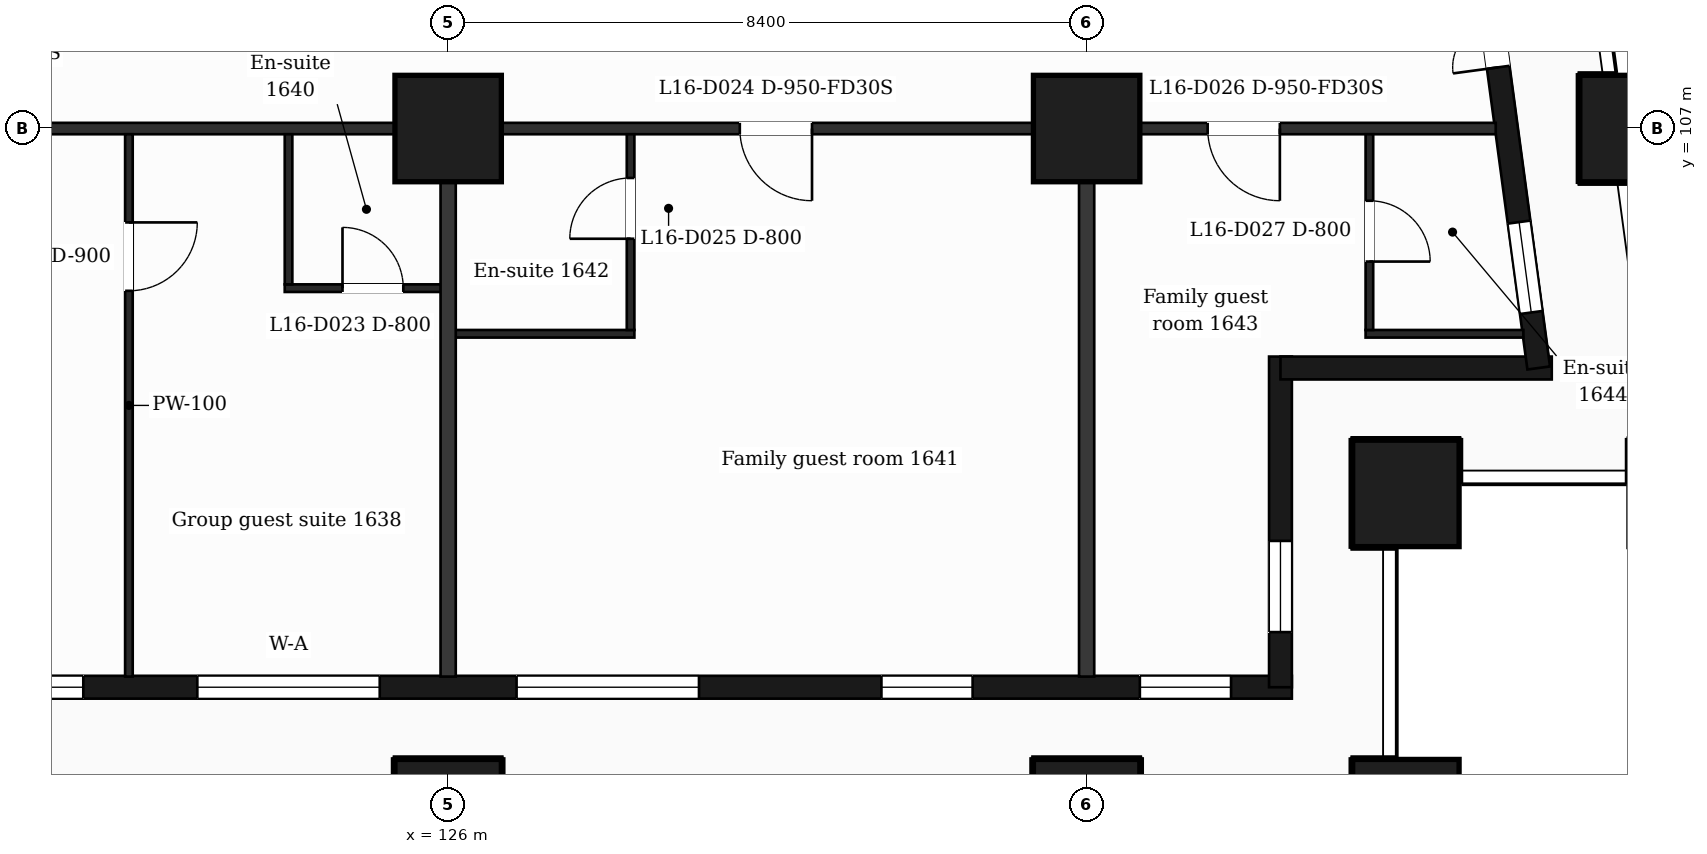
"""IFC4 building model, lengths in metres.
Left out: names, types, materials, properties, quantities, classifications, styles, units other than length and angle.
Written with IfcOpenShell. Run it as: python <this file> out.ifc"""

import sys

from ifc_helpers import new_model, si_unit, direction, frame, frame_2d, origin, origin_2d, place, context, subcontext, project, spatial, rectangle, extrude, element, fill, save


model = new_model("IFC4")
c1 = context("Model", 3, precision=1e-05, world=origin(), true_north=direction((0.0, 1.0)))
c2 = subcontext(c1, "Body", "Model", "MODEL_VIEW")
j1 = project(units=[si_unit("LENGTHUNIT", "METRE"), si_unit("PLANEANGLEUNIT", "RADIAN")], contexts=[c1])
p1 = place(None, origin())
s1 = spatial("IfcSite", under=j1, at=p1, CompositionType="ELEMENT")
p2 = place(p1, origin())
s2 = spatial("IfcBuilding", under=s1, at=p2, CompositionType="ELEMENT")
p3 = place(p2, frame((0.0, 0.0, 74.0)))
s3 = spatial("IfcBuildingStorey", under=s2, at=p3, CompositionType="ELEMENT", Elevation=74.0)
for number, where, z_axis, x_axis in (
    (1, (126.0, 98.0, 0.0), (0.0, 0.0, 1.0), (1.0, 0.0, 0.0)),
    (2, (134.4, 98.0, 0.0), (0.0, 0.0, 1.0), (1.0, 0.0, 0.0)),
    (3, (138.6, 98.0, 0.0), (0.0, 0.0, 1.0), (1.0, 0.0, 0.0)),
    (4, (138.6, 102.2, 0.0), (0.0, 0.0, 1.0), (1.0, 0.0, 0.0)),
    (5, (126.0, 107.0, 0.0), (0.0, 0.0, 1.0), (1.0, 0.0, 0.0)),
    (6, (134.4, 107.0, 0.0), (0.0, 0.0, 1.0), (1.0, 0.0, 0.0)),
    (7, (141.588, 107.0, 0.0), (0.0, 0.0, 1.0), (1.0, 0.0, 0.0)),
):
    element("IfcColumn", number, at=place(p3, frame(where, z_axis=z_axis, x_axis=x_axis)), inside=s3, PredefinedType="COLUMN", context=c2, shape_type="SweptSolid", body=[
        extrude(rectangle(XDim=1.4, YDim=1.4, at=origin_2d()), origin(), (0.0, 0.0, 1.0), 3.5),
    ])
p4 = place(p3, frame((89.85, 99.65, 0.0), z_axis=(0.0, 0.0, 1.0), x_axis=(1.0, 0.0, 0.0)))
e8 = element("IfcWall", 8, at=p4, inside=s3, PredefinedType="SOLIDWALL", context=c2, shape_type="SweptSolid", body=[
    extrude(rectangle(XDim=47.25, YDim=0.3, at=frame_2d((23.625, 0.0))), origin(), (0.0, 0.0, 1.0), 3.18),
])
p5 = place(p4, frame((0.725, 0.0, 0.9)))
e9 = element("IfcOpeningElement", 9, at=p5, cuts=e8, PredefinedType="OPENING", context=c2, shape_type="SweptSolid", body=[
    extrude(rectangle(XDim=1.2, YDim=2.1, at=frame_2d((0.6, 1.05))), frame((0.0, 0.16, 0.0), z_axis=(0.0, -1.0, 0.0), x_axis=(1.0, 0.0, 0.0)), (0.0, 0.0, 1.0), 0.32),
])
p6 = place(p4, frame((3.45, 0.0, 0.9)))
e10 = element("IfcOpeningElement", 10, at=p6, cuts=e8, PredefinedType="OPENING", context=c2, shape_type="SweptSolid", body=[
    extrude(rectangle(XDim=2.4, YDim=2.1, at=frame_2d((1.2, 1.05))), frame((0.0, 0.16, 0.0), z_axis=(0.0, -1.0, 0.0), x_axis=(1.0, 0.0, 0.0)), (0.0, 0.0, 1.0), 0.32),
])
p7 = place(p4, frame((7.65, 0.0, 0.9)))
e11 = element("IfcOpeningElement", 11, at=p7, cuts=e8, PredefinedType="OPENING", context=c2, shape_type="SweptSolid", body=[
    extrude(rectangle(XDim=2.4, YDim=2.1, at=frame_2d((1.2, 1.05))), frame((0.0, 0.16, 0.0), z_axis=(0.0, -1.0, 0.0), x_axis=(1.0, 0.0, 0.0)), (0.0, 0.0, 1.0), 0.32),
])
p8 = place(p4, frame((12.45, 0.0, 0.9)))
e12 = element("IfcOpeningElement", 12, at=p8, cuts=e8, PredefinedType="OPENING", context=c2, shape_type="SweptSolid", body=[
    extrude(rectangle(XDim=1.2, YDim=2.1, at=frame_2d((0.6, 1.05))), frame((0.0, 0.16, 0.0), z_axis=(0.0, -1.0, 0.0), x_axis=(1.0, 0.0, 0.0)), (0.0, 0.0, 1.0), 0.32),
])
p9 = place(p4, frame((16.65, 0.0, 0.9)))
e13 = element("IfcOpeningElement", 13, at=p9, cuts=e8, PredefinedType="OPENING", context=c2, shape_type="SweptSolid", body=[
    extrude(rectangle(XDim=1.2, YDim=2.1, at=frame_2d((0.6, 1.05))), frame((0.0, 0.16, 0.0), z_axis=(0.0, -1.0, 0.0), x_axis=(1.0, 0.0, 0.0)), (0.0, 0.0, 1.0), 0.32),
])
p10 = place(p4, frame((19.95, 0.0, 0.9)))
e14 = element("IfcOpeningElement", 14, at=p10, cuts=e8, PredefinedType="OPENING", context=c2, shape_type="SweptSolid", body=[
    extrude(rectangle(XDim=1.2, YDim=2.1, at=frame_2d((0.6, 1.05))), frame((0.0, 0.16, 0.0), z_axis=(0.0, -1.0, 0.0), x_axis=(1.0, 0.0, 0.0)), (0.0, 0.0, 1.0), 0.32),
])
p11 = place(p4, frame((21.75, 0.0, 0.9)))
e15 = element("IfcOpeningElement", 15, at=p11, cuts=e8, PredefinedType="OPENING", context=c2, shape_type="SweptSolid", body=[
    extrude(rectangle(XDim=1.2, YDim=2.1, at=frame_2d((0.6, 1.05))), frame((0.0, 0.16, 0.0), z_axis=(0.0, -1.0, 0.0), x_axis=(1.0, 0.0, 0.0)), (0.0, 0.0, 1.0), 0.32),
])
p12 = place(p4, frame((25.05, 0.0, 0.0)))
e16 = element("IfcOpeningElement", 16, at=p12, cuts=e8, PredefinedType="OPENING", context=c2, shape_type="SweptSolid", body=[
    extrude(rectangle(XDim=1.2, YDim=2.4, at=frame_2d((0.6, 1.2))), frame((0.0, 0.16, 0.0), z_axis=(0.0, -1.0, 0.0), x_axis=(1.0, 0.0, 0.0)), (0.0, 0.0, 1.0), 0.32),
])
p13 = place(p4, frame((28.35, 0.0, 0.9)))
e17 = element("IfcOpeningElement", 17, at=p13, cuts=e8, PredefinedType="OPENING", context=c2, shape_type="SweptSolid", body=[
    extrude(rectangle(XDim=1.2, YDim=2.1, at=frame_2d((0.6, 1.05))), frame((0.0, 0.16, 0.0), z_axis=(0.0, -1.0, 0.0), x_axis=(1.0, 0.0, 0.0)), (0.0, 0.0, 1.0), 0.32),
])
p14 = place(p4, frame((30.15, 0.0, 0.9)))
e18 = element("IfcOpeningElement", 18, at=p14, cuts=e8, PredefinedType="OPENING", context=c2, shape_type="SweptSolid", body=[
    extrude(rectangle(XDim=1.2, YDim=2.1, at=frame_2d((0.6, 1.05))), frame((0.0, 0.16, 0.0), z_axis=(0.0, -1.0, 0.0), x_axis=(1.0, 0.0, 0.0)), (0.0, 0.0, 1.0), 0.32),
])
p15 = place(p4, frame((32.85, 0.0, 0.9)))
e19 = element("IfcOpeningElement", 19, at=p15, cuts=e8, PredefinedType="OPENING", context=c2, shape_type="SweptSolid", body=[
    extrude(rectangle(XDim=2.4, YDim=2.1, at=frame_2d((1.2, 1.05))), frame((0.0, 0.16, 0.0), z_axis=(0.0, -1.0, 0.0), x_axis=(1.0, 0.0, 0.0)), (0.0, 0.0, 1.0), 0.32),
])
p16 = place(p4, frame((37.05, 0.0, 0.9)))
e20 = element("IfcOpeningElement", 20, at=p16, cuts=e8, PredefinedType="OPENING", context=c2, shape_type="SweptSolid", body=[
    extrude(rectangle(XDim=2.4, YDim=2.1, at=frame_2d((1.2, 1.05))), frame((0.0, 0.16, 0.0), z_axis=(0.0, -1.0, 0.0), x_axis=(1.0, 0.0, 0.0)), (0.0, 0.0, 1.0), 0.32),
])
p17 = place(p4, frame((41.85, 0.0, 0.9)))
e21 = element("IfcOpeningElement", 21, at=p17, cuts=e8, PredefinedType="OPENING", context=c2, shape_type="SweptSolid", body=[
    extrude(rectangle(XDim=1.2, YDim=2.1, at=frame_2d((0.6, 1.05))), frame((0.0, 0.16, 0.0), z_axis=(0.0, -1.0, 0.0), x_axis=(1.0, 0.0, 0.0)), (0.0, 0.0, 1.0), 0.32),
])
p18 = place(p4, frame((45.25, 0.0, 0.9)))
e22 = element("IfcOpeningElement", 22, at=p18, cuts=e8, PredefinedType="OPENING", context=c2, shape_type="SweptSolid", body=[
    extrude(rectangle(XDim=1.2, YDim=2.1, at=frame_2d((0.6, 1.05))), frame((0.0, 0.16, 0.0), z_axis=(0.0, -1.0, 0.0), x_axis=(1.0, 0.0, 0.0)), (0.0, 0.0, 1.0), 0.32),
])
p19 = place(p3, frame((136.95, 99.65, 0.0), z_axis=(0.0, 0.0, 1.0), x_axis=(0.0, 1.0, 0.0)))
e23 = element("IfcWall", 23, at=p19, inside=s3, PredefinedType="SOLIDWALL", context=c2, shape_type="SweptSolid", body=[
    extrude(rectangle(XDim=4.35, YDim=0.3, at=frame_2d((2.175, 0.0))), origin(), (0.0, 0.0, 1.0), 3.18),
])
p20 = place(p19, frame((0.725, 0.0, 0.9)))
e24 = element("IfcOpeningElement", 24, at=p20, cuts=e23, PredefinedType="OPENING", context=c2, shape_type="SweptSolid", body=[
    extrude(rectangle(XDim=1.2, YDim=2.1, at=frame_2d((0.6, 1.05))), frame((0.0, 0.16, 0.0), z_axis=(0.0, -1.0, 0.0), x_axis=(1.0, 0.0, 0.0)), (0.0, 0.0, 1.0), 0.32),
])
p21 = place(p3, frame((136.95, 103.85, 0.0), z_axis=(0.0, 0.0, 1.0), x_axis=(1.0, 0.0, 0.0)))
e25 = element("IfcWall", 25, at=p21, inside=s3, PredefinedType="SOLIDWALL", context=c2, shape_type="SweptSolid", body=[
    extrude(rectangle(XDim=3.569, YDim=0.3, at=frame_2d((1.785, 0.0))), origin(), (0.0, 0.0, 1.0), 3.18),
])
p22 = place(p3, frame((140.348, 103.85, 0.0), z_axis=(0.0, 0.0, 1.0), x_axis=(-0.133431549479, 0.991058031401, 0.0)))
e26 = element("IfcWall", 26, at=p22, inside=s3, PredefinedType="SOLIDWALL", context=c2, shape_type="SweptSolid", body=[
    extrude(rectangle(XDim=6.609, YDim=0.3, at=frame_2d((3.304, 0.0))), origin(), (0.0, 0.0, 1.0), 3.18),
])
p23 = place(p22, frame((0.737, 0.0, 0.9)))
e27 = element("IfcOpeningElement", 27, at=p23, cuts=e26, PredefinedType="OPENING", context=c2, shape_type="SweptSolid", body=[
    extrude(rectangle(XDim=1.2, YDim=2.1, at=frame_2d((0.6, 1.05))), frame((0.0, 0.16, 0.0), z_axis=(0.0, -1.0, 0.0), x_axis=(1.0, 0.0, 0.0)), (0.0, 0.0, 1.0), 0.32),
])
p24 = place(p22, frame((3.991, 0.0, 0.0)))
e28 = element("IfcOpeningElement", 28, at=p24, cuts=e26, PredefinedType="OPENING", context=c2, shape_type="SweptSolid", body=[
    extrude(rectangle(XDim=1.2, YDim=2.4, at=frame_2d((0.6, 1.2))), frame((0.0, 0.16, 0.0), z_axis=(0.0, -1.0, 0.0), x_axis=(1.0, 0.0, 0.0)), (0.0, 0.0, 1.0), 0.32),
])
p25 = place(p3, frame((126.0, 104.3, 0.0), z_axis=(0.0, 0.0, 1.0), x_axis=(1.0, 0.0, 0.0)))
e29 = element("IfcWall", 29, at=p25, inside=s3, PredefinedType="PARTITIONING", context=c2, shape_type="SweptSolid", body=[
    extrude(rectangle(XDim=2.45, YDim=0.1, at=frame_2d((1.225, 0.0))), origin(), (0.0, 0.0, 1.0), 3.18),
])
p26 = place(p3, frame((138.07, 104.3, 0.0), z_axis=(0.0, 0.0, 1.0), x_axis=(1.0, 0.0, 0.0)))
e30 = element("IfcWall", 30, at=p26, inside=s3, PredefinedType="PARTITIONING", context=c2, shape_type="SweptSolid", body=[
    extrude(rectangle(XDim=2.076, YDim=0.1, at=frame_2d((1.038, 0.0))), origin(), (0.0, 0.0, 1.0), 3.18),
])
p27 = place(p3, frame((123.85, 104.9, 0.0), z_axis=(0.0, 0.0, 1.0), x_axis=(1.0, 0.0, 0.0)))
e31 = element("IfcWall", 31, at=p27, inside=s3, PredefinedType="PARTITIONING", context=c2, shape_type="SweptSolid", body=[
    extrude(rectangle(XDim=2.15, YDim=0.1, at=frame_2d((1.075, 0.0))), origin(), (0.0, 0.0, 1.0), 3.18),
])
p28 = place(p27, frame((0.76, 0.0, 0.0)))
e32 = element("IfcOpeningElement", 32, at=p28, cuts=e31, PredefinedType="OPENING", context=c2, shape_type="SweptSolid", body=[
    extrude(rectangle(XDim=0.8, YDim=2.1, at=frame_2d((0.4, 1.05))), frame((0.0, 0.06, 0.0), z_axis=(0.0, -1.0, 0.0), x_axis=(1.0, 0.0, 0.0)), (0.0, 0.0, 1.0), 0.12),
])
p29 = place(p3, frame((87.018, 107.0, 0.0), z_axis=(0.0, 0.0, 1.0), x_axis=(1.0, 0.0, 0.0)))
e33 = element("IfcWall", 33, at=p29, inside=s3, PredefinedType="PARTITIONING", context=c2, shape_type="SweptSolid", body=[
    extrude(rectangle(XDim=52.765, YDim=0.15, at=frame_2d((26.382, 0.0))), origin(), (0.0, 0.0, 1.0), 3.18),
])
p30 = place(p29, frame((1.276, 0.0, 0.0)))
e34 = element("IfcOpeningElement", 34, at=p30, cuts=e33, PredefinedType="OPENING", context=c2, shape_type="SweptSolid", body=[
    extrude(rectangle(XDim=0.95, YDim=2.1, at=frame_2d((0.475, 1.05))), frame((0.0, 0.085, 0.0), z_axis=(0.0, -1.0, 0.0), x_axis=(1.0, 0.0, 0.0)), (0.0, 0.0, 1.0), 0.17),
])
p31 = place(p29, frame((10.757, 0.0, 0.0)))
e35 = element("IfcOpeningElement", 35, at=p31, cuts=e33, PredefinedType="OPENING", context=c2, shape_type="SweptSolid", body=[
    extrude(rectangle(XDim=1.0, YDim=2.1, at=frame_2d((0.5, 1.05))), frame((0.0, 0.085, 0.0), z_axis=(0.0, -1.0, 0.0), x_axis=(1.0, 0.0, 0.0)), (0.0, 0.0, 1.0), 0.17),
])
p32 = place(p29, frame((23.125, 0.0, 0.0)))
e36 = element("IfcOpeningElement", 36, at=p32, cuts=e33, PredefinedType="OPENING", context=c2, shape_type="SweptSolid", body=[
    extrude(rectangle(XDim=0.95, YDim=2.1, at=frame_2d((0.475, 1.05))), frame((0.0, 0.085, 0.0), z_axis=(0.0, -1.0, 0.0), x_axis=(1.0, 0.0, 0.0)), (0.0, 0.0, 1.0), 0.17),
])
p33 = place(p29, frame((31.757, 0.0, 0.0)))
e37 = element("IfcOpeningElement", 37, at=p33, cuts=e33, PredefinedType="OPENING", context=c2, shape_type="SweptSolid", body=[
    extrude(rectangle(XDim=1.0, YDim=2.1, at=frame_2d((0.5, 1.05))), frame((0.0, 0.085, 0.0), z_axis=(0.0, -1.0, 0.0), x_axis=(1.0, 0.0, 0.0)), (0.0, 0.0, 1.0), 0.17),
])
p34 = place(p29, frame((42.819, 0.0, 0.0)))
e38 = element("IfcOpeningElement", 38, at=p34, cuts=e33, PredefinedType="OPENING", context=c2, shape_type="SweptSolid", body=[
    extrude(rectangle(XDim=0.95, YDim=2.1, at=frame_2d((0.475, 1.05))), frame((0.0, 0.085, 0.0), z_axis=(0.0, -1.0, 0.0), x_axis=(1.0, 0.0, 0.0)), (0.0, 0.0, 1.0), 0.17),
])
p35 = place(p29, frame((48.974, 0.0, 0.0)))
e39 = element("IfcOpeningElement", 39, at=p35, cuts=e33, PredefinedType="OPENING", context=c2, shape_type="SweptSolid", body=[
    extrude(rectangle(XDim=0.95, YDim=2.1, at=frame_2d((0.475, 1.05))), frame((0.0, 0.085, 0.0), z_axis=(0.0, -1.0, 0.0), x_axis=(1.0, 0.0, 0.0)), (0.0, 0.0, 1.0), 0.17),
])
p36 = place(p3, frame((121.8, 99.79, 0.0), z_axis=(0.0, 0.0, 1.0), x_axis=(0.0, 1.0, 0.0)))
e40 = element("IfcWall", 40, at=p36, inside=s3, PredefinedType="PARTITIONING", context=c2, shape_type="SweptSolid", body=[
    extrude(rectangle(XDim=7.135, YDim=0.1, at=frame_2d((3.567, 0.0))), origin(), (0.0, 0.0, 1.0), 3.18),
])
p37 = place(p36, frame((5.075, 0.0, 0.0)))
e41 = element("IfcOpeningElement", 41, at=p37, cuts=e40, PredefinedType="OPENING", context=c2, shape_type="SweptSolid", body=[
    extrude(rectangle(XDim=0.9, YDim=2.1, at=frame_2d((0.45, 1.05))), frame((0.0, 0.06, 0.0), z_axis=(0.0, -1.0, 0.0), x_axis=(1.0, 0.0, 0.0)), (0.0, 0.0, 1.0), 0.12),
])
p38 = place(p3, frame((123.9, 104.95, 0.0), z_axis=(0.0, 0.0, 1.0), x_axis=(0.0, 1.0, 0.0)))
e42 = element("IfcWall", 42, at=p38, inside=s3, PredefinedType="PARTITIONING", context=c2, shape_type="SweptSolid", body=[
    extrude(rectangle(XDim=1.975, YDim=0.1, at=frame_2d((0.988, 0.0))), origin(), (0.0, 0.0, 1.0), 3.18),
])
p39 = place(p3, frame((126.0, 99.79, 0.0), z_axis=(0.0, 0.0, 1.0), x_axis=(0.0, 1.0, 0.0)))
e43 = element("IfcWall", 43, at=p39, inside=s3, PredefinedType="PARTITIONING", context=c2, shape_type="SweptSolid", body=[
    extrude(rectangle(XDim=7.135, YDim=0.2, at=frame_2d((3.567, 0.0))), origin(), (0.0, 0.0, 1.0), 3.18),
])
p40 = place(p3, frame((128.4, 104.35, 0.0), z_axis=(0.0, 0.0, 1.0), x_axis=(0.0, 1.0, 0.0)))
e44 = element("IfcWall", 44, at=p40, inside=s3, PredefinedType="PARTITIONING", context=c2, shape_type="SweptSolid", body=[
    extrude(rectangle(XDim=2.575, YDim=0.1, at=frame_2d((1.288, 0.0))), origin(), (0.0, 0.0, 1.0), 3.18),
])
p41 = place(p40, frame((1.2, 0.0, 0.0)))
e45 = element("IfcOpeningElement", 45, at=p41, cuts=e44, PredefinedType="OPENING", context=c2, shape_type="SweptSolid", body=[
    extrude(rectangle(XDim=0.8, YDim=2.1, at=frame_2d((0.4, 1.05))), frame((0.0, 0.06, 0.0), z_axis=(0.0, -1.0, 0.0), x_axis=(1.0, 0.0, 0.0)), (0.0, 0.0, 1.0), 0.12),
])
p42 = place(p3, frame((134.4, 99.79, 0.0), z_axis=(0.0, 0.0, 1.0), x_axis=(0.0, 1.0, 0.0)))
e46 = element("IfcWall", 46, at=p42, inside=s3, PredefinedType="PARTITIONING", context=c2, shape_type="SweptSolid", body=[
    extrude(rectangle(XDim=7.135, YDim=0.2, at=frame_2d((3.567, 0.0))), origin(), (0.0, 0.0, 1.0), 3.18),
])
p43 = place(p3, frame((138.12, 104.35, 0.0), z_axis=(0.0, 0.0, 1.0), x_axis=(0.0, 1.0, 0.0)))
e47 = element("IfcWall", 47, at=p43, inside=s3, PredefinedType="PARTITIONING", context=c2, shape_type="SweptSolid", body=[
    extrude(rectangle(XDim=2.575, YDim=0.1, at=frame_2d((1.288, 0.0))), origin(), (0.0, 0.0, 1.0), 3.18),
])
p44 = place(p43, frame((0.9, 0.0, 0.0)))
e48 = element("IfcOpeningElement", 48, at=p44, cuts=e47, PredefinedType="OPENING", context=c2, shape_type="SweptSolid", body=[
    extrude(rectangle(XDim=0.8, YDim=2.1, at=frame_2d((0.4, 1.05))), frame((0.0, 0.06, 0.0), z_axis=(0.0, -1.0, 0.0), x_axis=(1.0, 0.0, 0.0)), (0.0, 0.0, 1.0), 0.12),
])
p45 = place(p14, origin())
e49 = element("IfcWindow", 49, at=p45, inside=s3, PartitioningType="SINGLE_PANEL", PredefinedType="WINDOW", context=c2, shape_type="SweptSolid", body=[
    extrude(rectangle(XDim=1.2, YDim=2.1, at=frame_2d((0.6, 1.05))), frame((0.0, 0.03, 0.0), z_axis=(0.0, -1.0, 0.0), x_axis=(1.0, 0.0, 0.0)), (0.0, 0.0, 1.0), 0.06),
])
fill(e18, e49)
p46 = place(p15, origin())
e50 = element("IfcWindow", 50, at=p46, inside=s3, PartitioningType="SINGLE_PANEL", PredefinedType="WINDOW", context=c2, shape_type="SweptSolid", body=[
    extrude(rectangle(XDim=2.4, YDim=2.1, at=frame_2d((1.2, 1.05))), frame((0.0, 0.03, 0.0), z_axis=(0.0, -1.0, 0.0), x_axis=(1.0, 0.0, 0.0)), (0.0, 0.0, 1.0), 0.06),
])
fill(e19, e50)
p47 = place(p16, origin())
e51 = element("IfcWindow", 51, at=p47, inside=s3, PartitioningType="SINGLE_PANEL", PredefinedType="WINDOW", context=c2, shape_type="SweptSolid", body=[
    extrude(rectangle(XDim=2.4, YDim=2.1, at=frame_2d((1.2, 1.05))), frame((0.0, 0.03, 0.0), z_axis=(0.0, -1.0, 0.0), x_axis=(1.0, 0.0, 0.0)), (0.0, 0.0, 1.0), 0.06),
])
fill(e20, e51)
p48 = place(p17, origin())
e52 = element("IfcWindow", 52, at=p48, inside=s3, PartitioningType="SINGLE_PANEL", PredefinedType="WINDOW", context=c2, shape_type="SweptSolid", body=[
    extrude(rectangle(XDim=1.2, YDim=2.1, at=frame_2d((0.6, 1.05))), frame((0.0, 0.03, 0.0), z_axis=(0.0, -1.0, 0.0), x_axis=(1.0, 0.0, 0.0)), (0.0, 0.0, 1.0), 0.06),
])
fill(e21, e52)
p49 = place(p18, origin())
e53 = element("IfcWindow", 53, at=p49, inside=s3, PartitioningType="SINGLE_PANEL", PredefinedType="WINDOW", context=c2, shape_type="SweptSolid", body=[
    extrude(rectangle(XDim=1.2, YDim=2.1, at=frame_2d((0.6, 1.05))), frame((0.0, 0.03, 0.0), z_axis=(0.0, -1.0, 0.0), x_axis=(1.0, 0.0, 0.0)), (0.0, 0.0, 1.0), 0.06),
])
fill(e22, e53)
p50 = place(p20, origin())
e54 = element("IfcWindow", 54, at=p50, inside=s3, PartitioningType="SINGLE_PANEL", PredefinedType="WINDOW", context=c2, shape_type="SweptSolid", body=[
    extrude(rectangle(XDim=1.2, YDim=2.1, at=frame_2d((0.6, 1.05))), frame((0.0, 0.03, 0.0), z_axis=(0.0, -1.0, 0.0), x_axis=(1.0, 0.0, 0.0)), (0.0, 0.0, 1.0), 0.06),
])
fill(e24, e54)
p51 = place(p23, origin())
e55 = element("IfcWindow", 55, at=p51, inside=s3, PartitioningType="SINGLE_PANEL", PredefinedType="WINDOW", context=c2, shape_type="SweptSolid", body=[
    extrude(rectangle(XDim=1.2, YDim=2.1, at=frame_2d((0.6, 1.05))), frame((0.0, 0.03, 0.0), z_axis=(0.0, -1.0, 0.0), x_axis=(1.0, 0.0, 0.0)), (0.0, 0.0, 1.0), 0.06),
])
fill(e27, e55)
p52 = place(p24, origin())
e56 = element("IfcDoor", 56, at=p52, inside=s3, OperationType="DOUBLE_DOOR_SINGLE_SWING", PredefinedType="DOOR", context=c2, shape_type="SweptSolid", body=[
    extrude(rectangle(XDim=1.2, YDim=2.4, at=frame_2d((0.6, 1.2))), frame((0.0, 0.025, 0.0), z_axis=(0.0, -1.0, 0.0), x_axis=(1.0, 0.0, 0.0)), (0.0, 0.0, 1.0), 0.05),
])
fill(e28, e56)
p53 = place(p37, origin())
e57 = element("IfcDoor", 57, at=p53, inside=s3, OperationType="SINGLE_SWING_RIGHT", PredefinedType="DOOR", context=c2, shape_type="SweptSolid", body=[
    extrude(rectangle(XDim=0.9, YDim=2.1, at=frame_2d((0.45, 1.05))), frame((0.0, 0.025, 0.0), z_axis=(0.0, -1.0, 0.0), x_axis=(1.0, 0.0, 0.0)), (0.0, 0.0, 1.0), 0.05),
])
fill(e41, e57)
p54 = place(p28, origin())
e58 = element("IfcDoor", 58, at=p54, inside=s3, OperationType="SINGLE_SWING_LEFT", PredefinedType="DOOR", context=c2, shape_type="SweptSolid", body=[
    extrude(rectangle(XDim=0.8, YDim=2.1, at=frame_2d((0.4, 1.05))), frame((0.0, 0.025, 0.0), z_axis=(0.0, -1.0, 0.0), x_axis=(1.0, 0.0, 0.0)), (0.0, 0.0, 1.0), 0.05),
])
fill(e32, e58)
p55 = place(p34, origin())
e59 = element("IfcDoor", 59, at=p55, inside=s3, OperationType="SINGLE_SWING_RIGHT", PredefinedType="DOOR", context=c2, shape_type="SweptSolid", body=[
    extrude(rectangle(XDim=0.95, YDim=2.1, at=frame_2d((0.475, 1.05))), frame((0.0, 0.025, 0.0), z_axis=(0.0, -1.0, 0.0), x_axis=(1.0, 0.0, 0.0)), (0.0, 0.0, 1.0), 0.05),
])
fill(e38, e59)
p56 = place(p41, origin())
e60 = element("IfcDoor", 60, at=p56, inside=s3, OperationType="SINGLE_SWING_LEFT", PredefinedType="DOOR", context=c2, shape_type="SweptSolid", body=[
    extrude(rectangle(XDim=0.8, YDim=2.1, at=frame_2d((0.4, 1.05))), frame((0.0, 0.025, 0.0), z_axis=(0.0, -1.0, 0.0), x_axis=(1.0, 0.0, 0.0)), (0.0, 0.0, 1.0), 0.05),
])
fill(e45, e60)
p57 = place(p35, origin())
e61 = element("IfcDoor", 61, at=p57, inside=s3, OperationType="SINGLE_SWING_RIGHT", PredefinedType="DOOR", context=c2, shape_type="SweptSolid", body=[
    extrude(rectangle(XDim=0.95, YDim=2.1, at=frame_2d((0.475, 1.05))), frame((0.0, 0.025, 0.0), z_axis=(0.0, -1.0, 0.0), x_axis=(1.0, 0.0, 0.0)), (0.0, 0.0, 1.0), 0.05),
])
fill(e39, e61)
p58 = place(p44, origin())
e62 = element("IfcDoor", 62, at=p58, inside=s3, OperationType="SINGLE_SWING_LEFT", PredefinedType="DOOR", context=c2, shape_type="SweptSolid", body=[
    extrude(rectangle(XDim=0.8, YDim=2.1, at=frame_2d((0.4, 1.05))), frame((0.0, 0.025, 0.0), z_axis=(0.0, -1.0, 0.0), x_axis=(1.0, 0.0, 0.0)), (0.0, 0.0, 1.0), 0.05),
])
fill(e48, e62)
save(model, sys.argv[1])
